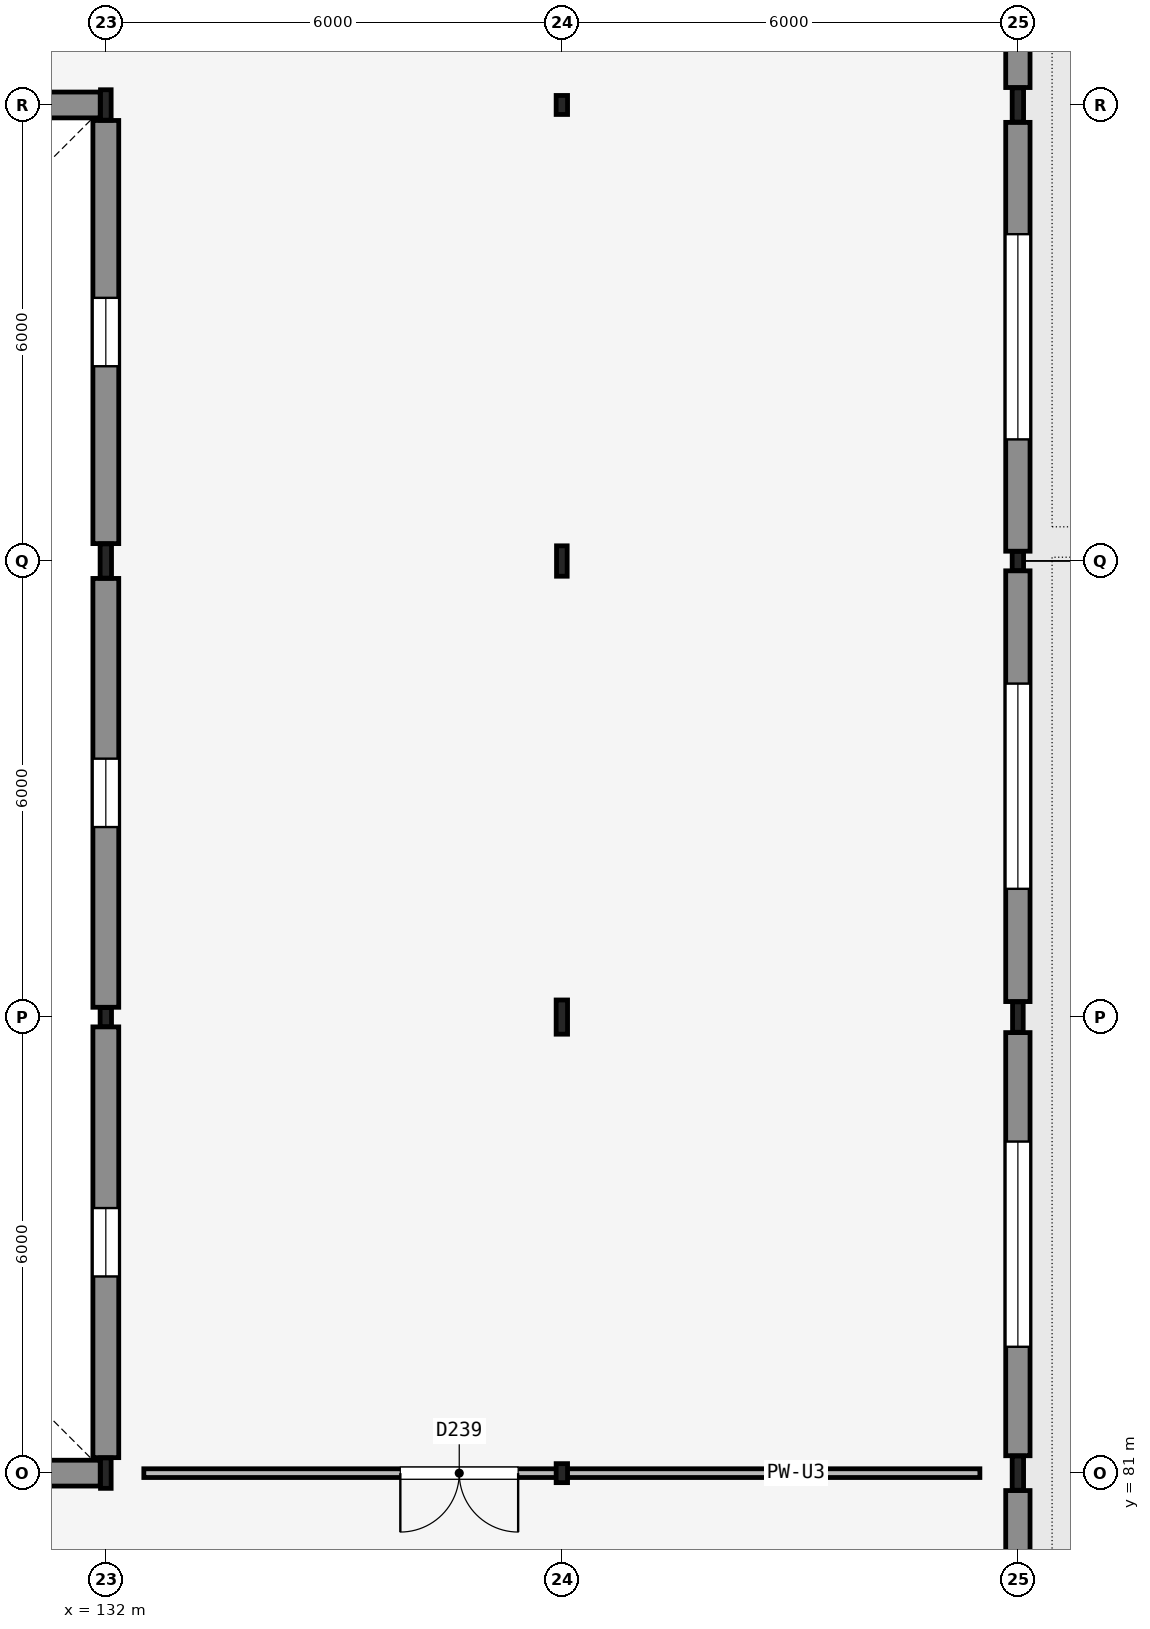
"""IFC4 building model, lengths in metres.
Left out: names, types, materials, properties, quantities, classifications, styles, units other than length and angle.
Written with IfcOpenShell. Run it as: python <this file> out.ifc"""

import sys

from ifc_helpers import new_model, si_unit, direction, frame, frame_2d, origin, origin_2d, place, context, subcontext, project, spatial, rectangle, hollow_rectangle, i_section, extrude, element, fill, save


model = new_model("IFC4")
c1 = context("Model", 3, precision=1e-05, world=origin(), true_north=direction((0.0, 1.0)))
c2 = subcontext(c1, "Body", "Model", "MODEL_VIEW")
j1 = project(units=[si_unit("LENGTHUNIT", "METRE"), si_unit("PLANEANGLEUNIT", "RADIAN")], contexts=[c1])
p1 = place(None, origin())
s1 = spatial("IfcSite", under=j1, at=p1, CompositionType="ELEMENT")
p2 = place(p1, origin())
s2 = spatial("IfcBuilding", under=s1, at=p2, CompositionType="ELEMENT")
p3 = place(p2, frame((0.0, 0.0, 9.3)))
s3 = spatial("IfcBuildingStorey", under=s2, at=p3, CompositionType="ELEMENT", Elevation=9.3)
p4 = place(p3, frame((132.0, 81.0, 0.0), z_axis=(0.0, 0.0, 1.0), x_axis=(1.0, 0.0, 0.0)))
e1 = element("IfcColumn", 1, at=p4, inside=s3, PredefinedType="COLUMN", context=c2, shape_type="SweptSolid", body=[
    extrude(i_section(OverallWidth=0.14, OverallDepth=0.4, WebThickness=0.009, FlangeThickness=0.016, FilletRadius=0.014, at=origin_2d()), origin(), (0.0, 0.0, 1.0), 4.2),
])
p5 = place(p3, frame((132.0, 87.0, 0.0), z_axis=(0.0, 0.0, 1.0), x_axis=(1.0, 0.0, 0.0)))
e2 = element("IfcColumn", 2, at=p5, inside=s3, PredefinedType="COLUMN", context=c2, shape_type="SweptSolid", body=[
    extrude(hollow_rectangle(XDim=0.15, YDim=0.25, WallThickness=0.01, InnerFilletRadius=0.01, OuterFilletRadius=0.02, at=origin_2d()), origin(), (0.0, 0.0, 1.0), 4.2),
])
p6 = place(p3, frame((132.0, 93.0, 0.0), z_axis=(0.0, 0.0, 1.0), x_axis=(1.0, 0.0, 0.0)))
e3 = element("IfcColumn", 3, at=p6, inside=s3, PredefinedType="COLUMN", context=c2, shape_type="SweptSolid", body=[
    extrude(i_section(OverallWidth=0.15, OverallDepth=0.45, WebThickness=0.01, FlangeThickness=0.017, FilletRadius=0.015, at=origin_2d()), origin(), (0.0, 0.0, 1.0), 4.2),
])
p7 = place(p3, frame((132.0, 99.0, 0.0), z_axis=(0.0, 0.0, 1.0), x_axis=(1.0, 0.0, 0.0)))
e4 = element("IfcColumn", 4, at=p7, inside=s3, PredefinedType="COLUMN", context=c2, shape_type="SweptSolid", body=[
    extrude(i_section(OverallWidth=0.14, OverallDepth=0.4, WebThickness=0.009, FlangeThickness=0.016, FilletRadius=0.014, at=origin_2d()), origin(), (0.0, 0.0, 1.0), 4.2),
])
p8 = place(p3, frame((138.0, 81.0, 0.0), z_axis=(0.0, 0.0, 1.0), x_axis=(1.0, 0.0, 0.0)))
e5 = element("IfcColumn", 5, at=p8, inside=s3, PredefinedType="COLUMN", context=c2, shape_type="SweptSolid", body=[
    extrude(hollow_rectangle(XDim=0.15, YDim=0.25, WallThickness=0.01, InnerFilletRadius=0.01, OuterFilletRadius=0.02, at=origin_2d()), origin(), (0.0, 0.0, 1.0), 4.2),
])
p9 = place(p3, frame((138.0, 87.0, 0.0), z_axis=(0.0, 0.0, 1.0), x_axis=(1.0, 0.0, 0.0)))
e6 = element("IfcColumn", 6, at=p9, inside=s3, PredefinedType="COLUMN", context=c2, shape_type="SweptSolid", body=[
    extrude(i_section(OverallWidth=0.15, OverallDepth=0.45, WebThickness=0.01, FlangeThickness=0.017, FilletRadius=0.015, at=origin_2d()), origin(), (0.0, 0.0, 1.0), 4.2),
])
p10 = place(p3, frame((138.0, 93.0, 0.0), z_axis=(0.0, 0.0, 1.0), x_axis=(1.0, 0.0, 0.0)))
e7 = element("IfcColumn", 7, at=p10, inside=s3, PredefinedType="COLUMN", context=c2, shape_type="SweptSolid", body=[
    extrude(i_section(OverallWidth=0.14, OverallDepth=0.4, WebThickness=0.009, FlangeThickness=0.016, FilletRadius=0.014, at=origin_2d()), origin(), (0.0, 0.0, 1.0), 4.2),
])
p11 = place(p3, frame((138.0, 99.0, 0.0), z_axis=(0.0, 0.0, 1.0), x_axis=(1.0, 0.0, 0.0)))
e8 = element("IfcColumn", 8, at=p11, inside=s3, PredefinedType="COLUMN", context=c2, shape_type="SweptSolid", body=[
    extrude(hollow_rectangle(XDim=0.15, YDim=0.25, WallThickness=0.01, InnerFilletRadius=0.01, OuterFilletRadius=0.02, at=origin_2d()), origin(), (0.0, 0.0, 1.0), 4.2),
])
p12 = place(p3, frame((144.0, 81.0, 0.0), z_axis=(0.0, 0.0, 1.0), x_axis=(1.0, 0.0, 0.0)))
e9 = element("IfcColumn", 9, at=p12, inside=s3, PredefinedType="COLUMN", context=c2, shape_type="SweptSolid", body=[
    extrude(i_section(OverallWidth=0.15, OverallDepth=0.45, WebThickness=0.01, FlangeThickness=0.017, FilletRadius=0.015, at=origin_2d()), origin(), (0.0, 0.0, 1.0), 4.2),
])
p13 = place(p3, frame((144.0, 87.0, 0.0), z_axis=(0.0, 0.0, 1.0), x_axis=(1.0, 0.0, 0.0)))
e10 = element("IfcColumn", 10, at=p13, inside=s3, PredefinedType="COLUMN", context=c2, shape_type="SweptSolid", body=[
    extrude(i_section(OverallWidth=0.14, OverallDepth=0.4, WebThickness=0.009, FlangeThickness=0.016, FilletRadius=0.014, at=origin_2d()), origin(), (0.0, 0.0, 1.0), 4.2),
])
p14 = place(p3, frame((144.0, 93.0, 0.0), z_axis=(0.0, 0.0, 1.0), x_axis=(1.0, 0.0, 0.0)))
e11 = element("IfcColumn", 11, at=p14, inside=s3, PredefinedType="COLUMN", context=c2, shape_type="SweptSolid", body=[
    extrude(hollow_rectangle(XDim=0.15, YDim=0.25, WallThickness=0.01, InnerFilletRadius=0.01, OuterFilletRadius=0.02, at=origin_2d()), origin(), (0.0, 0.0, 1.0), 4.2),
])
p15 = place(p3, frame((144.0, 99.0, 0.0), z_axis=(0.0, 0.0, 1.0), x_axis=(1.0, 0.0, 0.0)))
e12 = element("IfcColumn", 12, at=p15, inside=s3, PredefinedType="COLUMN", context=c2, shape_type="SweptSolid", body=[
    extrude(i_section(OverallWidth=0.15, OverallDepth=0.45, WebThickness=0.01, FlangeThickness=0.017, FilletRadius=0.015, at=origin_2d()), origin(), (0.0, 0.0, 1.0), 4.2),
])
p16 = place(p3, frame((144.0, 75.129, 0.0), z_axis=(0.0, 0.0, 1.0), x_axis=(0.0, 1.0, 0.0)))
e13 = element("IfcWall", 13, at=p16, inside=s3, PredefinedType="SOLIDWALL", context=c2, shape_type="SweptSolid", body=[
    extrude(rectangle(XDim=5.642, YDim=0.32, at=frame_2d((2.821, 0.0))), origin(), (0.0, 0.0, 1.0), 3.29),
])
p17 = place(p16, frame((1.471, 0.0, 0.9)))
e14 = element("IfcOpeningElement", 14, at=p17, cuts=e13, PredefinedType="OPENING", context=c2, shape_type="SweptSolid", body=[
    extrude(rectangle(XDim=2.7, YDim=1.5, at=frame_2d((1.35, 0.75))), frame((0.0, 0.17, 0.0), z_axis=(0.0, -1.0, 0.0), x_axis=(1.0, 0.0, 0.0)), (0.0, 0.0, 1.0), 0.34),
])
p18 = place(p3, frame((144.0, 81.229, 0.0), z_axis=(0.0, 0.0, 1.0), x_axis=(0.0, 1.0, 0.0)))
e15 = element("IfcWall", 15, at=p18, inside=s3, PredefinedType="SOLIDWALL", context=c2, shape_type="SweptSolid", body=[
    extrude(rectangle(XDim=5.567, YDim=0.32, at=frame_2d((2.783, 0.0))), origin(), (0.0, 0.0, 1.0), 3.29),
])
p19 = place(p18, frame((1.434, 0.0, 0.9)))
e16 = element("IfcOpeningElement", 16, at=p19, cuts=e15, PredefinedType="OPENING", context=c2, shape_type="SweptSolid", body=[
    extrude(rectangle(XDim=2.7, YDim=1.5, at=frame_2d((1.35, 0.75))), frame((0.0, 0.17, 0.0), z_axis=(0.0, -1.0, 0.0), x_axis=(1.0, 0.0, 0.0)), (0.0, 0.0, 1.0), 0.34),
])
p20 = place(p3, frame((144.0, 87.204, 0.0), z_axis=(0.0, 0.0, 1.0), x_axis=(0.0, 1.0, 0.0)))
e17 = element("IfcWall", 17, at=p20, inside=s3, PredefinedType="SOLIDWALL", context=c2, shape_type="SweptSolid", body=[
    extrude(rectangle(XDim=5.667, YDim=0.32, at=frame_2d((2.833, 0.0))), origin(), (0.0, 0.0, 1.0), 3.29),
])
p21 = place(p20, frame((1.483, 0.0, 0.9)))
e18 = element("IfcOpeningElement", 18, at=p21, cuts=e17, PredefinedType="OPENING", context=c2, shape_type="SweptSolid", body=[
    extrude(rectangle(XDim=2.7, YDim=1.5, at=frame_2d((1.35, 0.75))), frame((0.0, 0.17, 0.0), z_axis=(0.0, -1.0, 0.0), x_axis=(1.0, 0.0, 0.0)), (0.0, 0.0, 1.0), 0.34),
])
p22 = place(p3, frame((144.0, 93.129, 0.0), z_axis=(0.0, 0.0, 1.0), x_axis=(0.0, 1.0, 0.0)))
e19 = element("IfcWall", 19, at=p22, inside=s3, PredefinedType="SOLIDWALL", context=c2, shape_type="SweptSolid", body=[
    extrude(rectangle(XDim=5.642, YDim=0.32, at=frame_2d((2.821, 0.0))), origin(), (0.0, 0.0, 1.0), 3.29),
])
p23 = place(p22, frame((1.471, 0.0, 0.9)))
e20 = element("IfcOpeningElement", 20, at=p23, cuts=e19, PredefinedType="OPENING", context=c2, shape_type="SweptSolid", body=[
    extrude(rectangle(XDim=2.7, YDim=1.5, at=frame_2d((1.35, 0.75))), frame((0.0, 0.17, 0.0), z_axis=(0.0, -1.0, 0.0), x_axis=(1.0, 0.0, 0.0)), (0.0, 0.0, 1.0), 0.34),
])
p24 = place(p3, frame((144.0, 99.229, 0.0), z_axis=(0.0, 0.0, 1.0), x_axis=(0.0, 1.0, 0.0)))
e21 = element("IfcWall", 21, at=p24, inside=s3, PredefinedType="SOLIDWALL", context=c2, shape_type="SweptSolid", body=[
    extrude(rectangle(XDim=5.567, YDim=0.32, at=frame_2d((2.783, 0.0))), origin(), (0.0, 0.0, 1.0), 3.29),
])
p25 = place(p24, frame((1.434, 0.0, 0.9)))
e22 = element("IfcOpeningElement", 22, at=p25, cuts=e21, PredefinedType="OPENING", context=c2, shape_type="SweptSolid", body=[
    extrude(rectangle(XDim=2.7, YDim=1.5, at=frame_2d((1.35, 0.75))), frame((0.0, 0.17, 0.0), z_axis=(0.0, -1.0, 0.0), x_axis=(1.0, 0.0, 0.0)), (0.0, 0.0, 1.0), 0.34),
])
p26 = place(p3, frame((126.079, 81.0, 0.0), z_axis=(0.0, 0.0, 1.0), x_axis=(1.0, 0.0, 0.0)))
e23 = element("IfcWall", 23, at=p26, inside=s3, PredefinedType="SOLIDWALL", context=c2, shape_type="SweptSolid", body=[
    extrude(rectangle(XDim=5.847, YDim=0.34, at=frame_2d((2.923, 0.0))), origin(), (0.0, 0.0, 1.0), 3.29),
])
p27 = place(p26, frame((2.473, 0.0, 1.6)))
e24 = element("IfcOpeningElement", 24, at=p27, cuts=e23, PredefinedType="OPENING", context=c2, shape_type="SweptSolid", body=[
    extrude(rectangle(XDim=0.9, YDim=0.6, at=frame_2d((0.45, 0.3))), frame((0.0, 0.18, 0.0), z_axis=(0.0, -1.0, 0.0), x_axis=(1.0, 0.0, 0.0)), (0.0, 0.0, 1.0), 0.36),
])
p28 = place(p3, frame((126.079, 99.0, 0.0), z_axis=(0.0, 0.0, 1.0), x_axis=(1.0, 0.0, 0.0)))
e25 = element("IfcWall", 25, at=p28, inside=s3, PredefinedType="SOLIDWALL", context=c2, shape_type="SweptSolid", body=[
    extrude(rectangle(XDim=5.847, YDim=0.34, at=frame_2d((2.923, 0.0))), origin(), (0.0, 0.0, 1.0), 3.484),
])
p29 = place(p28, frame((2.473, 0.0, 1.6)))
e26 = element("IfcOpeningElement", 26, at=p29, cuts=e25, PredefinedType="OPENING", context=c2, shape_type="SweptSolid", body=[
    extrude(rectangle(XDim=0.9, YDim=0.6, at=frame_2d((0.45, 0.3))), frame((0.0, 0.18, 0.0), z_axis=(0.0, -1.0, 0.0), x_axis=(1.0, 0.0, 0.0)), (0.0, 0.0, 1.0), 0.36),
])
p30 = place(p3, frame((132.0, 81.204, 0.0), z_axis=(0.0, 0.0, 1.0), x_axis=(0.0, 1.0, 0.0)))
e27 = element("IfcWall", 27, at=p30, inside=s3, PredefinedType="SOLIDWALL", context=c2, shape_type="SweptSolid", body=[
    extrude(rectangle(XDim=5.667, YDim=0.34, at=frame_2d((2.833, 0.0))), origin(), (0.0, 0.0, 1.0), 3.29),
])
p31 = place(p30, frame((2.384, 0.0, 1.6)))
e28 = element("IfcOpeningElement", 28, at=p31, cuts=e27, PredefinedType="OPENING", context=c2, shape_type="SweptSolid", body=[
    extrude(rectangle(XDim=0.9, YDim=0.6, at=frame_2d((0.45, 0.3))), frame((0.0, 0.18, 0.0), z_axis=(0.0, -1.0, 0.0), x_axis=(1.0, 0.0, 0.0)), (0.0, 0.0, 1.0), 0.36),
])
p32 = place(p3, frame((132.0, 87.129, 0.0), z_axis=(0.0, 0.0, 1.0), x_axis=(0.0, 1.0, 0.0)))
e29 = element("IfcWall", 29, at=p32, inside=s3, PredefinedType="SOLIDWALL", context=c2, shape_type="SweptSolid", body=[
    extrude(rectangle(XDim=5.642, YDim=0.34, at=frame_2d((2.821, 0.0))), origin(), (0.0, 0.0, 1.0), 3.39),
])
p33 = place(p32, frame((2.371, 0.0, 1.6)))
e30 = element("IfcOpeningElement", 30, at=p33, cuts=e29, PredefinedType="OPENING", context=c2, shape_type="SweptSolid", body=[
    extrude(rectangle(XDim=0.9, YDim=0.6, at=frame_2d((0.45, 0.3))), frame((0.0, 0.18, 0.0), z_axis=(0.0, -1.0, 0.0), x_axis=(1.0, 0.0, 0.0)), (0.0, 0.0, 1.0), 0.36),
])
p34 = place(p3, frame((132.0, 93.229, 0.0), z_axis=(0.0, 0.0, 1.0), x_axis=(0.0, 1.0, 0.0)))
e31 = element("IfcWall", 31, at=p34, inside=s3, PredefinedType="SOLIDWALL", context=c2, shape_type="SweptSolid", body=[
    extrude(rectangle(XDim=5.567, YDim=0.34, at=frame_2d((2.783, 0.0))), origin(), (0.0, 0.0, 1.0), 3.39),
])
p35 = place(p34, frame((2.333, 0.0, 1.6)))
e32 = element("IfcOpeningElement", 32, at=p35, cuts=e31, PredefinedType="OPENING", context=c2, shape_type="SweptSolid", body=[
    extrude(rectangle(XDim=0.9, YDim=0.6, at=frame_2d((0.45, 0.3))), frame((0.0, 0.18, 0.0), z_axis=(0.0, -1.0, 0.0), x_axis=(1.0, 0.0, 0.0)), (0.0, 0.0, 1.0), 0.36),
])
p36 = place(p3, frame((143.5, 81.0, 0.0), z_axis=(0.0, 0.0, 1.0), x_axis=(-1.0, 0.0, 0.0)))
e33 = element("IfcWall", 33, at=p36, inside=s3, PredefinedType="PARTITIONING", context=c2, shape_type="SweptSolid", body=[
    extrude(rectangle(XDim=11.0, YDim=0.115, at=frame_2d((5.5, 0.0))), origin(), (0.0, 0.0, 1.0), 3.29),
])
p37 = place(p36, frame((6.075, 0.0, 0.0)))
e34 = element("IfcOpeningElement", 34, at=p37, cuts=e33, PredefinedType="OPENING", context=c2, shape_type="SweptSolid", body=[
    extrude(rectangle(XDim=1.55, YDim=2.2, at=frame_2d((0.775, 1.1))), frame((0.0, 0.067, 0.0), z_axis=(0.0, -1.0, 0.0), x_axis=(1.0, 0.0, 0.0)), (0.0, 0.0, 1.0), 0.135),
])
p38 = place(p19, origin())
e35 = element("IfcWindow", 35, at=p38, inside=s3, PartitioningType="SINGLE_PANEL", PredefinedType="WINDOW", context=c2, shape_type="SweptSolid", body=[
    extrude(rectangle(XDim=2.7, YDim=1.5, at=frame_2d((1.35, 0.75))), frame((0.0, 0.03, 0.0), z_axis=(0.0, -1.0, 0.0), x_axis=(1.0, 0.0, 0.0)), (0.0, 0.0, 1.0), 0.06),
])
fill(e16, e35)
p39 = place(p21, origin())
e36 = element("IfcWindow", 36, at=p39, inside=s3, PartitioningType="SINGLE_PANEL", PredefinedType="WINDOW", context=c2, shape_type="SweptSolid", body=[
    extrude(rectangle(XDim=2.7, YDim=1.5, at=frame_2d((1.35, 0.75))), frame((0.0, 0.03, 0.0), z_axis=(0.0, -1.0, 0.0), x_axis=(1.0, 0.0, 0.0)), (0.0, 0.0, 1.0), 0.06),
])
fill(e18, e36)
p40 = place(p23, origin())
e37 = element("IfcWindow", 37, at=p40, inside=s3, PartitioningType="SINGLE_PANEL", PredefinedType="WINDOW", context=c2, shape_type="SweptSolid", body=[
    extrude(rectangle(XDim=2.7, YDim=1.5, at=frame_2d((1.35, 0.75))), frame((0.0, 0.03, 0.0), z_axis=(0.0, -1.0, 0.0), x_axis=(1.0, 0.0, 0.0)), (0.0, 0.0, 1.0), 0.06),
])
fill(e20, e37)
p41 = place(p31, origin())
e38 = element("IfcWindow", 38, at=p41, inside=s3, PartitioningType="SINGLE_PANEL", PredefinedType="WINDOW", context=c2, shape_type="SweptSolid", body=[
    extrude(rectangle(XDim=0.9, YDim=0.6, at=frame_2d((0.45, 0.3))), frame((0.0, 0.03, 0.0), z_axis=(0.0, -1.0, 0.0), x_axis=(1.0, 0.0, 0.0)), (0.0, 0.0, 1.0), 0.06),
])
fill(e28, e38)
p42 = place(p33, origin())
e39 = element("IfcWindow", 39, at=p42, inside=s3, PartitioningType="SINGLE_PANEL", PredefinedType="WINDOW", context=c2, shape_type="SweptSolid", body=[
    extrude(rectangle(XDim=0.9, YDim=0.6, at=frame_2d((0.45, 0.3))), frame((0.0, 0.03, 0.0), z_axis=(0.0, -1.0, 0.0), x_axis=(1.0, 0.0, 0.0)), (0.0, 0.0, 1.0), 0.06),
])
fill(e30, e39)
p43 = place(p35, origin())
e40 = element("IfcWindow", 40, at=p43, inside=s3, PartitioningType="SINGLE_PANEL", PredefinedType="WINDOW", context=c2, shape_type="SweptSolid", body=[
    extrude(rectangle(XDim=0.9, YDim=0.6, at=frame_2d((0.45, 0.3))), frame((0.0, 0.03, 0.0), z_axis=(0.0, -1.0, 0.0), x_axis=(1.0, 0.0, 0.0)), (0.0, 0.0, 1.0), 0.06),
])
fill(e32, e40)
p44 = place(p37, origin())
e41 = element("IfcDoor", 41, at=p44, inside=s3, OperationType="DOUBLE_DOOR_SINGLE_SWING", PredefinedType="DOOR", context=c2, shape_type="SweptSolid", body=[
    extrude(rectangle(XDim=1.55, YDim=2.2, at=frame_2d((0.775, 1.1))), frame((0.0, 0.025, 0.0), z_axis=(0.0, -1.0, 0.0), x_axis=(1.0, 0.0, 0.0)), (0.0, 0.0, 1.0), 0.05),
])
fill(e34, e41)
save(model, sys.argv[1])
